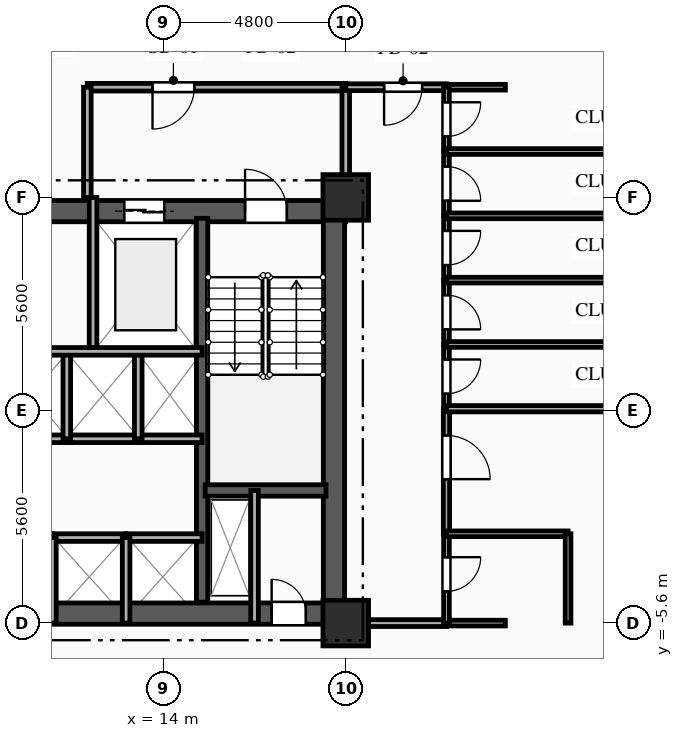
"""IFC4 building model, lengths in metres.
Left out: names, types, materials, properties, quantities, classifications, styles, units other than length and angle.
Written with IfcOpenShell. Run it as: python <this file> out.ifc"""

import sys

from ifc_helpers import new_model, si_unit, direction, frame, frame_2d, origin, origin_2d, place, context, subcontext, project, spatial, rectangle, extrude, element, fill, save


model = new_model("IFC4")
c1 = context("Model", 3, precision=1e-05, world=origin(), true_north=direction((0.0, 1.0)))
c2 = subcontext(c1, "Body", "Model", "MODEL_VIEW")
j1 = project(units=[si_unit("LENGTHUNIT", "METRE"), si_unit("PLANEANGLEUNIT", "RADIAN")], contexts=[c1])
p1 = place(None, origin())
s1 = spatial("IfcSite", under=j1, at=p1, CompositionType="ELEMENT")
p2 = place(p1, origin())
s2 = spatial("IfcBuilding", under=s1, at=p2, CompositionType="ELEMENT")
p3 = place(p2, frame((0.0, 0.0, 60.5)))
s3 = spatial("IfcBuildingStorey", under=s2, at=p3, CompositionType="ELEMENT", Elevation=60.5)
for number, where, z_axis, x_axis in (
    (1, (18.8, -5.6, 0.0), (0.0, 0.0, 1.0), (1.0, 0.0, 0.0)),
    (2, (18.8, 5.6, 0.0), (0.0, 0.0, 1.0), (1.0, 0.0, 0.0)),
):
    element("IfcColumn", number, at=place(p3, frame(where, z_axis=z_axis, x_axis=x_axis)), inside=s3, PredefinedType="COLUMN", context=c2, shape_type="SweptSolid", body=[
        extrude(rectangle(XDim=1.2, YDim=1.2, at=origin_2d()), origin(), (0.0, 0.0, 1.0), 3.35),
    ])
p4 = place(p3, frame((9.2, 5.24, 0.0), z_axis=(0.0, 0.0, 1.0), x_axis=(1.0, 0.0, 0.0)))
e3 = element("IfcWall", 3, at=p4, inside=s3, PredefinedType="SHEAR", context=c2, shape_type="SweptSolid", body=[
    extrude(rectangle(XDim=9.6, YDim=0.56, at=frame_2d((4.8, 0.0))), origin(), (0.0, 0.0, 1.0), 3.035),
])
p5 = place(p4, frame((6.95, 0.0, 0.0)))
e4 = element("IfcOpeningElement", 4, at=p5, cuts=e3, PredefinedType="OPENING", context=c2, shape_type="SweptSolid", body=[
    extrude(rectangle(XDim=1.1, YDim=2.15, at=frame_2d((0.55, 1.075))), frame((0.0, 0.29, 0.0), z_axis=(0.0, -1.0, 0.0), x_axis=(1.0, 0.0, 0.0)), (0.0, 0.0, 1.0), 0.58),
])
p6 = place(p4, frame((3.775, 0.0, 0.0)))
e5 = element("IfcOpeningElement", 5, at=p6, cuts=e3, PredefinedType="OPENING", context=c2, shape_type="SweptSolid", body=[
    extrude(rectangle(XDim=1.05, YDim=2.1, at=frame_2d((0.525, 1.05))), frame((0.0, 0.29, 0.0), z_axis=(0.0, -1.0, 0.0), x_axis=(1.0, 0.0, 0.0)), (0.0, 0.0, 1.0), 0.58),
])
p7 = place(p3, frame((9.2, -5.35, 0.0), z_axis=(0.0, 0.0, 1.0), x_axis=(1.0, 0.0, 0.0)))
e6 = element("IfcWall", 6, at=p7, inside=s3, PredefinedType="SHEAR", context=c2, shape_type="SweptSolid", body=[
    extrude(rectangle(XDim=9.6, YDim=0.56, at=frame_2d((4.8, 0.0))), origin(), (0.0, 0.0, 1.0), 3.035),
])
p8 = place(p7, frame((7.65, 0.0, 0.0)))
e7 = element("IfcOpeningElement", 7, at=p8, cuts=e6, PredefinedType="OPENING", context=c2, shape_type="SweptSolid", body=[
    extrude(rectangle(XDim=0.9, YDim=2.1, at=frame_2d((0.45, 1.05))), frame((0.0, 0.29, 0.0), z_axis=(0.0, -1.0, 0.0), x_axis=(1.0, 0.0, 0.0)), (0.0, 0.0, 1.0), 0.58),
])
p9 = place(p3, frame((18.49, -5.05, 0.0), z_axis=(0.0, 0.0, 1.0), x_axis=(0.0, 1.0, 0.0)))
e8 = element("IfcWall", 8, at=p9, inside=s3, PredefinedType="SHEAR", context=c2, shape_type="SweptSolid", body=[
    extrude(rectangle(XDim=10.1, YDim=0.56, at=frame_2d((5.05, 0.0))), origin(), (0.0, 0.0, 1.0), 3.035),
])
p10 = place(p3, frame((15.02, -5.05, 0.0), z_axis=(0.0, 0.0, 1.0), x_axis=(0.0, 1.0, 0.0)))
e9 = element("IfcWall", 9, at=p10, inside=s3, PredefinedType="SHEAR", context=c2, shape_type="SweptSolid", body=[
    extrude(rectangle(XDim=10.1, YDim=0.3, at=frame_2d((5.05, 0.0))), origin(), (0.0, 0.0, 1.0), 3.035),
])
p11 = place(p3, frame((15.1, -2.11, 0.0), z_axis=(0.0, 0.0, 1.0), x_axis=(1.0, 0.0, 0.0)))
e10 = element("IfcWall", 10, at=p11, inside=s3, PredefinedType="SHEAR", context=c2, shape_type="SweptSolid", body=[
    extrude(rectangle(XDim=3.18, YDim=0.3, at=frame_2d((1.59, 0.0))), origin(), (0.0, 0.0, 1.0), 3.035),
])
p12 = place(p3, frame((16.4, -2.11, 0.0), z_axis=(0.0, 0.0, 1.0), x_axis=(0.0, -1.0, 0.0)))
e11 = element("IfcWall", 11, at=p12, inside=s3, PredefinedType="PARTITIONING", context=c2, shape_type="SweptSolid", body=[
    extrude(rectangle(XDim=3.49, YDim=0.2, at=frame_2d((1.745, 0.0))), origin(), (0.0, 0.0, 1.0), 3.035),
])
p13 = place(p3, frame((12.15, 5.6, 0.0), z_axis=(0.0, 0.0, 1.0), x_axis=(0.0, -1.0, 0.0)))
e12 = element("IfcWall", 12, at=p13, inside=s3, PredefinedType="PARTITIONING", context=c2, shape_type="SweptSolid", body=[
    extrude(rectangle(XDim=4.05, YDim=0.2, at=frame_2d((2.025, 0.0))), origin(), (0.0, 0.0, 1.0), 3.035),
])
p14 = place(p3, frame((18.8, 8.5, 0.0), z_axis=(0.0, 0.0, 1.0), x_axis=(-1.0, 0.0, 0.0)))
e13 = element("IfcWall", 13, at=p14, inside=s3, PredefinedType="PARTITIONING", context=c2, shape_type="SweptSolid", body=[
    extrude(rectangle(XDim=6.8, YDim=0.2, at=frame_2d((3.4, 0.0))), origin(), (0.0, 0.0, 1.0), 3.035),
])
p15 = place(p14, frame((3.985, 0.0, 0.0)))
e14 = element("IfcOpeningElement", 14, at=p15, cuts=e13, PredefinedType="OPENING", context=c2, shape_type="SweptSolid", body=[
    extrude(rectangle(XDim=1.1, YDim=2.15, at=frame_2d((0.55, 1.075))), frame((0.0, 0.11, 0.0), z_axis=(0.0, -1.0, 0.0), x_axis=(1.0, 0.0, 0.0)), (0.0, 0.0, 1.0), 0.22),
])
p16 = place(p3, frame((12.0, 8.5, 0.0), z_axis=(0.0, 0.0, 1.0), x_axis=(0.0, -1.0, 0.0)))
e15 = element("IfcWall", 15, at=p16, inside=s3, PredefinedType="PARTITIONING", context=c2, shape_type="SweptSolid", body=[
    extrude(rectangle(XDim=2.9, YDim=0.2, at=frame_2d((1.45, 0.0))), origin(), (0.0, 0.0, 1.0), 3.035),
])
p17 = place(p3, frame((18.8, 5.6, 0.0), z_axis=(0.0, 0.0, 1.0), x_axis=(0.0, 1.0, 0.0)))
e16 = element("IfcWall", 16, at=p17, inside=s3, PredefinedType="PARTITIONING", context=c2, shape_type="SweptSolid", body=[
    extrude(rectangle(XDim=2.9, YDim=0.2, at=frame_2d((1.45, 0.0))), origin(), (0.0, 0.0, 1.0), 2.52),
])
p18 = place(p3, frame((9.2, -3.35, 0.0), z_axis=(0.0, 0.0, 1.0), x_axis=(1.0, 0.0, 0.0)))
e17 = element("IfcWall", 17, at=p18, inside=s3, PredefinedType="PARTITIONING", context=c2, shape_type="SweptSolid", body=[
    extrude(rectangle(XDim=1.88, YDim=0.2, at=frame_2d((0.94, 0.0))), origin(), (0.0, 0.0, 1.0), 2.75),
])
p19 = place(p3, frame((11.08, -3.35, 0.0), z_axis=(0.0, 0.0, 1.0), x_axis=(1.0, 0.0, 0.0)))
e18 = element("IfcWall", 18, at=p19, inside=s3, PredefinedType="PARTITIONING", context=c2, shape_type="SweptSolid", body=[
    extrude(rectangle(XDim=1.94, YDim=0.2, at=frame_2d((0.97, 0.0))), origin(), (0.0, 0.0, 1.0), 3.035),
])
p20 = place(p3, frame((13.02, -3.35, 0.0), z_axis=(0.0, 0.0, 1.0), x_axis=(1.0, 0.0, 0.0)))
e19 = element("IfcWall", 19, at=p20, inside=s3, PredefinedType="PARTITIONING", context=c2, shape_type="SweptSolid", body=[
    extrude(rectangle(XDim=2.0, YDim=0.2, at=frame_2d((1.0, 0.0))), origin(), (0.0, 0.0, 1.0), 3.035),
])
p21 = place(p3, frame((11.46, -0.75, 0.0), z_axis=(0.0, 0.0, 1.0), x_axis=(-1.0, 0.0, 0.0)))
e20 = element("IfcWall", 20, at=p21, inside=s3, PredefinedType="PARTITIONING", context=c2, shape_type="SweptSolid", body=[
    extrude(rectangle(XDim=2.26, YDim=0.2, at=frame_2d((1.13, 0.0))), origin(), (0.0, 0.0, 1.0), 3.035),
])
p22 = place(p3, frame((13.34, -0.75, 0.0), z_axis=(0.0, 0.0, 1.0), x_axis=(-1.0, 0.0, 0.0)))
e21 = element("IfcWall", 21, at=p22, inside=s3, PredefinedType="PARTITIONING", context=c2, shape_type="SweptSolid", body=[
    extrude(rectangle(XDim=1.88, YDim=0.2, at=frame_2d((0.94, 0.0))), origin(), (0.0, 0.0, 1.0), 3.035),
])
p23 = place(p3, frame((15.02, -0.75, 0.0), z_axis=(0.0, 0.0, 1.0), x_axis=(-1.0, 0.0, 0.0)))
e22 = element("IfcWall", 22, at=p23, inside=s3, PredefinedType="PARTITIONING", context=c2, shape_type="SweptSolid", body=[
    extrude(rectangle(XDim=1.68, YDim=0.2, at=frame_2d((0.84, 0.0))), origin(), (0.0, 0.0, 1.0), 3.035),
])
for number, where, z_axis, x_axis in (
    (23, (11.08, -5.6, 0.0), (0.0, 0.0, 1.0), (0.0, 1.0, 0.0)),
    (24, (13.02, -5.6, 0.0), (0.0, 0.0, 1.0), (0.0, 1.0, 0.0)),
):
    element("IfcWall", number, at=place(p3, frame(where, z_axis=z_axis, x_axis=x_axis)), inside=s3, PredefinedType="PARTITIONING", context=c2, shape_type="SweptSolid", body=[
        extrude(rectangle(XDim=2.25, YDim=0.2, at=frame_2d((1.125, 0.0))), origin(), (0.0, 0.0, 1.0), 3.035),
    ])
for number, where, z_axis, x_axis in (
    (25, (11.46, -0.75, 0.0), (0.0, 0.0, 1.0), (0.0, 1.0, 0.0)),
    (26, (13.34, -0.75, 0.0), (0.0, 0.0, 1.0), (0.0, 1.0, 0.0)),
):
    element("IfcWall", number, at=place(p3, frame(where, z_axis=z_axis, x_axis=x_axis)), inside=s3, PredefinedType="PARTITIONING", context=c2, shape_type="SweptSolid", body=[
        extrude(rectangle(XDim=2.3, YDim=0.2, at=frame_2d((1.15, 0.0))), origin(), (0.0, 0.0, 1.0), 3.035),
    ])
p24 = place(p3, frame((21.45, 8.5, 0.0), z_axis=(0.0, 0.0, 1.0), x_axis=(-1.0, 0.0, 0.0)))
e27 = element("IfcWall", 27, at=p24, inside=s3, PredefinedType="PARTITIONING", context=c2, shape_type="SweptSolid", body=[
    extrude(rectangle(XDim=2.65, YDim=0.18, at=frame_2d((1.325, 0.0))), origin(), (0.0, 0.0, 1.0), 3.035),
])
p25 = place(p24, frame((0.641, 0.0, 0.0)))
e28 = element("IfcOpeningElement", 28, at=p25, cuts=e27, PredefinedType="OPENING", context=c2, shape_type="SweptSolid", body=[
    extrude(rectangle(XDim=1.0, YDim=2.15, at=frame_2d((0.5, 1.075))), frame((0.0, 0.1, 0.0), z_axis=(0.0, -1.0, 0.0), x_axis=(1.0, 0.0, 0.0)), (0.0, 0.0, 1.0), 0.2),
])
p26 = place(p3, frame((23.0, 8.5, 0.0), z_axis=(0.0, 0.0, 1.0), x_axis=(-1.0, 0.0, 0.0)))
e29 = element("IfcWall", 29, at=p26, inside=s3, PredefinedType="PARTITIONING", context=c2, shape_type="SweptSolid", body=[
    extrude(rectangle(XDim=1.55, YDim=0.15, at=frame_2d((0.775, 0.0))), origin(), (0.0, 0.0, 1.0), 3.035),
])
p27 = place(p3, frame((18.8, -5.6, 0.0), z_axis=(0.0, 0.0, 1.0), x_axis=(1.0, 0.0, 0.0)))
e30 = element("IfcWall", 30, at=p27, inside=s3, PredefinedType="PARTITIONING", context=c2, shape_type="SweptSolid", body=[
    extrude(rectangle(XDim=2.65, YDim=0.18, at=frame_2d((1.325, 0.0))), origin(), (0.0, 0.0, 1.0), 3.035),
])
p28 = place(p3, frame((21.45, -5.6, 0.0), z_axis=(0.0, 0.0, 1.0), x_axis=(1.0, 0.0, 0.0)))
e31 = element("IfcWall", 31, at=p28, inside=s3, PredefinedType="PLUMBINGWALL", context=c2, shape_type="SweptSolid", body=[
    extrude(rectangle(XDim=1.55, YDim=0.15, at=frame_2d((0.775, 0.0))), origin(), (0.0, 0.0, 1.0), 3.035),
])
p29 = place(p3, frame((21.45, -3.25, 0.0), z_axis=(0.0, 0.0, 1.0), x_axis=(0.0, -1.0, 0.0)))
e32 = element("IfcWall", 32, at=p29, inside=s3, PredefinedType="PLUMBINGWALL", context=c2, shape_type="SweptSolid", body=[
    extrude(rectangle(XDim=2.35, YDim=0.15, at=frame_2d((1.175, 0.0))), origin(), (0.0, 0.0, 1.0), 3.035),
])
p30 = place(p29, frame((0.616, 0.0, 0.0)))
e33 = element("IfcOpeningElement", 33, at=p30, cuts=e32, PredefinedType="OPENING", context=c2, shape_type="SweptSolid", body=[
    extrude(rectangle(XDim=0.9, YDim=2.1, at=frame_2d((0.45, 1.05))), frame((0.0, 0.085, 0.0), z_axis=(0.0, -1.0, 0.0), x_axis=(1.0, 0.0, 0.0)), (0.0, 0.0, 1.0), 0.17),
])
p31 = place(p3, frame((21.45, 0.04, 0.0), z_axis=(0.0, 0.0, 1.0), x_axis=(0.0, -1.0, 0.0)))
e34 = element("IfcWall", 34, at=p31, inside=s3, PredefinedType="PARTITIONING", context=c2, shape_type="SweptSolid", body=[
    extrude(rectangle(XDim=3.29, YDim=0.165, at=frame_2d((1.645, 0.0))), origin(), (0.0, 0.0, 1.0), 3.035),
])
p32 = place(p31, frame((0.702, 0.0, 0.0)))
e35 = element("IfcOpeningElement", 35, at=p32, cuts=e34, PredefinedType="OPENING", context=c2, shape_type="SweptSolid", body=[
    extrude(rectangle(XDim=1.15, YDim=2.15, at=frame_2d((0.575, 1.075))), frame((0.0, 0.093, 0.0), z_axis=(0.0, -1.0, 0.0), x_axis=(1.0, 0.0, 0.0)), (0.0, 0.0, 1.0), 0.185),
])
p33 = place(p3, frame((21.45, 1.732, 0.0), z_axis=(0.0, 0.0, 1.0), x_axis=(0.0, -1.0, 0.0)))
e36 = element("IfcWall", 36, at=p33, inside=s3, PredefinedType="PARTITIONING", context=c2, shape_type="SweptSolid", body=[
    extrude(rectangle(XDim=1.692, YDim=0.15, at=frame_2d((0.846, 0.0))), origin(), (0.0, 0.0, 1.0), 3.035),
])
p34 = place(p33, frame((0.396, 0.0, 0.0)))
e37 = element("IfcOpeningElement", 37, at=p34, cuts=e36, PredefinedType="OPENING", context=c2, shape_type="SweptSolid", body=[
    extrude(rectangle(XDim=0.9, YDim=2.1, at=frame_2d((0.45, 1.05))), frame((0.0, 0.085, 0.0), z_axis=(0.0, -1.0, 0.0), x_axis=(1.0, 0.0, 0.0)), (0.0, 0.0, 1.0), 0.17),
])
p35 = place(p3, frame((21.45, 3.424, 0.0), z_axis=(0.0, 0.0, 1.0), x_axis=(0.0, -1.0, 0.0)))
e38 = element("IfcWall", 38, at=p35, inside=s3, PredefinedType="PARTITIONING", context=c2, shape_type="SweptSolid", body=[
    extrude(rectangle(XDim=1.692, YDim=0.15, at=frame_2d((0.846, 0.0))), origin(), (0.0, 0.0, 1.0), 3.035),
])
p36 = place(p35, frame((0.396, 0.0, 0.0)))
e39 = element("IfcOpeningElement", 39, at=p36, cuts=e38, PredefinedType="OPENING", context=c2, shape_type="SweptSolid", body=[
    extrude(rectangle(XDim=0.9, YDim=2.1, at=frame_2d((0.45, 1.05))), frame((0.0, 0.085, 0.0), z_axis=(0.0, -1.0, 0.0), x_axis=(1.0, 0.0, 0.0)), (0.0, 0.0, 1.0), 0.17),
])
p37 = place(p3, frame((21.45, 5.116, 0.0), z_axis=(0.0, 0.0, 1.0), x_axis=(0.0, -1.0, 0.0)))
e40 = element("IfcWall", 40, at=p37, inside=s3, PredefinedType="PARTITIONING", context=c2, shape_type="SweptSolid", body=[
    extrude(rectangle(XDim=1.692, YDim=0.15, at=frame_2d((0.846, 0.0))), origin(), (0.0, 0.0, 1.0), 3.035),
])
p38 = place(p37, frame((0.396, 0.0, 0.0)))
e41 = element("IfcOpeningElement", 41, at=p38, cuts=e40, PredefinedType="OPENING", context=c2, shape_type="SweptSolid", body=[
    extrude(rectangle(XDim=0.9, YDim=2.1, at=frame_2d((0.45, 1.05))), frame((0.0, 0.085, 0.0), z_axis=(0.0, -1.0, 0.0), x_axis=(1.0, 0.0, 0.0)), (0.0, 0.0, 1.0), 0.17),
])
p39 = place(p3, frame((21.45, 6.808, 0.0), z_axis=(0.0, 0.0, 1.0), x_axis=(0.0, -1.0, 0.0)))
e42 = element("IfcWall", 42, at=p39, inside=s3, PredefinedType="PARTITIONING", context=c2, shape_type="SweptSolid", body=[
    extrude(rectangle(XDim=1.692, YDim=0.15, at=frame_2d((0.846, 0.0))), origin(), (0.0, 0.0, 1.0), 3.035),
])
p40 = place(p39, frame((0.396, 0.0, 0.0)))
e43 = element("IfcOpeningElement", 43, at=p40, cuts=e42, PredefinedType="OPENING", context=c2, shape_type="SweptSolid", body=[
    extrude(rectangle(XDim=0.9, YDim=2.1, at=frame_2d((0.45, 1.05))), frame((0.0, 0.085, 0.0), z_axis=(0.0, -1.0, 0.0), x_axis=(1.0, 0.0, 0.0)), (0.0, 0.0, 1.0), 0.17),
])
p41 = place(p3, frame((21.45, 8.5, 0.0), z_axis=(0.0, 0.0, 1.0), x_axis=(0.0, -1.0, 0.0)))
e44 = element("IfcWall", 44, at=p41, inside=s3, PredefinedType="PARTITIONING", context=c2, shape_type="SweptSolid", body=[
    extrude(rectangle(XDim=1.692, YDim=0.15, at=frame_2d((0.846, 0.0))), origin(), (0.0, 0.0, 1.0), 3.035),
])
p42 = place(p41, frame((0.396, 0.0, 0.0)))
e45 = element("IfcOpeningElement", 45, at=p42, cuts=e44, PredefinedType="OPENING", context=c2, shape_type="SweptSolid", body=[
    extrude(rectangle(XDim=0.9, YDim=2.1, at=frame_2d((0.45, 1.05))), frame((0.0, 0.085, 0.0), z_axis=(0.0, -1.0, 0.0), x_axis=(1.0, 0.0, 0.0)), (0.0, 0.0, 1.0), 0.17),
])
p43 = place(p3, frame((21.45, -3.25, 0.0), z_axis=(0.0, 0.0, 1.0), x_axis=(1.0, 0.0, 0.0)))
e46 = element("IfcWall", 46, at=p43, inside=s3, PredefinedType="PLUMBINGWALL", context=c2, shape_type="SweptSolid", body=[
    extrude(rectangle(XDim=3.2, YDim=0.15, at=frame_2d((1.6, 0.0))), origin(), (0.0, 0.0, 1.0), 2.52),
])
p44 = place(p3, frame((24.65, -3.25, 0.0), z_axis=(0.0, 0.0, 1.0), x_axis=(0.0, -1.0, 0.0)))
e47 = element("IfcWall", 47, at=p44, inside=s3, PredefinedType="PLUMBINGWALL", context=c2, shape_type="SweptSolid", body=[
    extrude(rectangle(XDim=2.35, YDim=0.15, at=frame_2d((1.175, 0.0))), origin(), (0.0, 0.0, 1.0), 3.035),
])
p45 = place(p3, frame((21.45, 0.04, 0.0), z_axis=(0.0, 0.0, 1.0), x_axis=(1.0, 0.0, 0.0)))
e48 = element("IfcWall", 48, at=p45, inside=s3, PredefinedType="PARTITIONING", context=c2, shape_type="SweptSolid", body=[
    extrude(rectangle(XDim=11.35, YDim=0.165, at=frame_2d((5.675, 0.0))), origin(), (0.0, 0.0, 1.0), 3.035),
])
p46 = place(p3, frame((21.45, 1.732, 0.0), z_axis=(0.0, 0.0, 1.0), x_axis=(1.0, 0.0, 0.0)))
e49 = element("IfcWall", 49, at=p46, inside=s3, PredefinedType="PARTITIONING", context=c2, shape_type="SweptSolid", body=[
    extrude(rectangle(XDim=11.35, YDim=0.15, at=frame_2d((5.675, 0.0))), origin(), (0.0, 0.0, 1.0), 3.035),
])
for number, where, z_axis, x_axis in (
    (50, (21.45, 3.424, 0.0), (0.0, 0.0, 1.0), (1.0, 0.0, 0.0)),
    (51, (21.45, 5.116, 0.0), (0.0, 0.0, 1.0), (1.0, 0.0, 0.0)),
):
    element("IfcWall", number, at=place(p3, frame(where, z_axis=z_axis, x_axis=x_axis)), inside=s3, PredefinedType="PARTITIONING", context=c2, shape_type="SweptSolid", body=[
        extrude(rectangle(XDim=11.35, YDim=0.15, at=frame_2d((5.675, 0.0))), origin(), (0.0, 0.0, 1.0), 2.52),
    ])
p47 = place(p3, frame((21.45, 6.808, 0.0), z_axis=(0.0, 0.0, 1.0), x_axis=(1.0, 0.0, 0.0)))
e52 = element("IfcWall", 52, at=p47, inside=s3, PredefinedType="PARTITIONING", context=c2, shape_type="SweptSolid", body=[
    extrude(rectangle(XDim=11.35, YDim=0.15, at=frame_2d((5.675, 0.0))), origin(), (0.0, 0.0, 1.0), 3.035),
])
p48 = place(p3, frame((9.2, 1.55, 0.0), z_axis=(0.0, 0.0, 1.0), x_axis=(1.0, 0.0, 0.0)))
e53 = element("IfcWall", 53, at=p48, inside=s3, PredefinedType="PARTITIONING", context=c2, shape_type="SweptSolid", body=[
    extrude(rectangle(XDim=5.82, YDim=0.2, at=frame_2d((2.91, 0.0))), origin(), (0.0, 0.0, 1.0), 3.035),
])
p49 = place(p5, origin())
e54 = element("IfcDoor", 54, at=p49, inside=s3, OperationType="SINGLE_SWING_LEFT", PredefinedType="DOOR", context=c2, shape_type="SweptSolid", body=[
    extrude(rectangle(XDim=1.1, YDim=2.15, at=frame_2d((0.55, 1.075))), frame((0.0, 0.025, 0.0), z_axis=(0.0, -1.0, 0.0), x_axis=(1.0, 0.0, 0.0)), (0.0, 0.0, 1.0), 0.05),
])
fill(e4, e54)
p50 = place(p6, origin())
e55 = element("IfcDoor", 55, at=p50, inside=s3, OperationType="DOUBLE_DOOR_SLIDING", PredefinedType="DOOR", context=c2, shape_type="SweptSolid", body=[
    extrude(rectangle(XDim=1.05, YDim=2.1, at=frame_2d((0.525, 1.05))), frame((0.0, 0.025, 0.0), z_axis=(0.0, -1.0, 0.0), x_axis=(1.0, 0.0, 0.0)), (0.0, 0.0, 1.0), 0.05),
])
fill(e5, e55)
p51 = place(p8, origin())
e56 = element("IfcDoor", 56, at=p51, inside=s3, OperationType="SINGLE_SWING_LEFT", PredefinedType="DOOR", context=c2, shape_type="SweptSolid", body=[
    extrude(rectangle(XDim=0.9, YDim=2.1, at=frame_2d((0.45, 1.05))), frame((0.0, 0.025, 0.0), z_axis=(0.0, -1.0, 0.0), x_axis=(1.0, 0.0, 0.0)), (0.0, 0.0, 1.0), 0.05),
])
fill(e7, e56)
p52 = place(p15, origin())
e57 = element("IfcDoor", 57, at=p52, inside=s3, OperationType="SINGLE_SWING_RIGHT", PredefinedType="DOOR", context=c2, shape_type="SweptSolid", body=[
    extrude(rectangle(XDim=1.1, YDim=2.15, at=frame_2d((0.55, 1.075))), frame((0.0, 0.025, 0.0), z_axis=(0.0, -1.0, 0.0), x_axis=(1.0, 0.0, 0.0)), (0.0, 0.0, 1.0), 0.05),
])
fill(e14, e57)
p53 = place(p25, origin())
e58 = element("IfcDoor", 58, at=p53, inside=s3, OperationType="SINGLE_SWING_RIGHT", PredefinedType="DOOR", context=c2, shape_type="SweptSolid", body=[
    extrude(rectangle(XDim=1.0, YDim=2.15, at=frame_2d((0.5, 1.075))), frame((0.0, 0.025, 0.0), z_axis=(0.0, -1.0, 0.0), x_axis=(1.0, 0.0, 0.0)), (0.0, 0.0, 1.0), 0.05),
])
fill(e28, e58)
p54 = place(p30, origin())
e59 = element("IfcDoor", 59, at=p54, inside=s3, OperationType="SINGLE_SWING_LEFT", PredefinedType="DOOR", context=c2, shape_type="SweptSolid", body=[
    extrude(rectangle(XDim=0.9, YDim=2.1, at=frame_2d((0.45, 1.05))), frame((0.0, 0.025, 0.0), z_axis=(0.0, -1.0, 0.0), x_axis=(1.0, 0.0, 0.0)), (0.0, 0.0, 1.0), 0.05),
])
fill(e33, e59)
p55 = place(p32, origin())
e60 = element("IfcDoor", 60, at=p55, inside=s3, OperationType="SINGLE_SWING_RIGHT", PredefinedType="DOOR", context=c2, shape_type="SweptSolid", body=[
    extrude(rectangle(XDim=1.15, YDim=2.15, at=frame_2d((0.575, 1.075))), frame((0.0, 0.025, 0.0), z_axis=(0.0, -1.0, 0.0), x_axis=(1.0, 0.0, 0.0)), (0.0, 0.0, 1.0), 0.05),
])
fill(e35, e60)
p56 = place(p34, origin())
e61 = element("IfcDoor", 61, at=p56, inside=s3, OperationType="SINGLE_SWING_LEFT", PredefinedType="DOOR", context=c2, shape_type="SweptSolid", body=[
    extrude(rectangle(XDim=0.9, YDim=2.1, at=frame_2d((0.45, 1.05))), frame((0.0, 0.025, 0.0), z_axis=(0.0, -1.0, 0.0), x_axis=(1.0, 0.0, 0.0)), (0.0, 0.0, 1.0), 0.05),
])
fill(e37, e61)
p57 = place(p36, origin())
e62 = element("IfcDoor", 62, at=p57, inside=s3, OperationType="SINGLE_SWING_RIGHT", PredefinedType="DOOR", context=c2, shape_type="SweptSolid", body=[
    extrude(rectangle(XDim=0.9, YDim=2.1, at=frame_2d((0.45, 1.05))), frame((0.0, 0.025, 0.0), z_axis=(0.0, -1.0, 0.0), x_axis=(1.0, 0.0, 0.0)), (0.0, 0.0, 1.0), 0.05),
])
fill(e39, e62)
p58 = place(p38, origin())
e63 = element("IfcDoor", 63, at=p58, inside=s3, OperationType="SINGLE_SWING_LEFT", PredefinedType="DOOR", context=c2, shape_type="SweptSolid", body=[
    extrude(rectangle(XDim=0.9, YDim=2.1, at=frame_2d((0.45, 1.05))), frame((0.0, 0.025, 0.0), z_axis=(0.0, -1.0, 0.0), x_axis=(1.0, 0.0, 0.0)), (0.0, 0.0, 1.0), 0.05),
])
fill(e41, e63)
p59 = place(p40, origin())
e64 = element("IfcDoor", 64, at=p59, inside=s3, OperationType="SINGLE_SWING_RIGHT", PredefinedType="DOOR", context=c2, shape_type="SweptSolid", body=[
    extrude(rectangle(XDim=0.9, YDim=2.1, at=frame_2d((0.45, 1.05))), frame((0.0, 0.025, 0.0), z_axis=(0.0, -1.0, 0.0), x_axis=(1.0, 0.0, 0.0)), (0.0, 0.0, 1.0), 0.05),
])
fill(e43, e64)
p60 = place(p42, origin())
e65 = element("IfcDoor", 65, at=p60, inside=s3, OperationType="SINGLE_SWING_LEFT", PredefinedType="DOOR", context=c2, shape_type="SweptSolid", body=[
    extrude(rectangle(XDim=0.9, YDim=2.1, at=frame_2d((0.45, 1.05))), frame((0.0, 0.025, 0.0), z_axis=(0.0, -1.0, 0.0), x_axis=(1.0, 0.0, 0.0)), (0.0, 0.0, 1.0), 0.05),
])
fill(e45, e65)
save(model, sys.argv[1])
